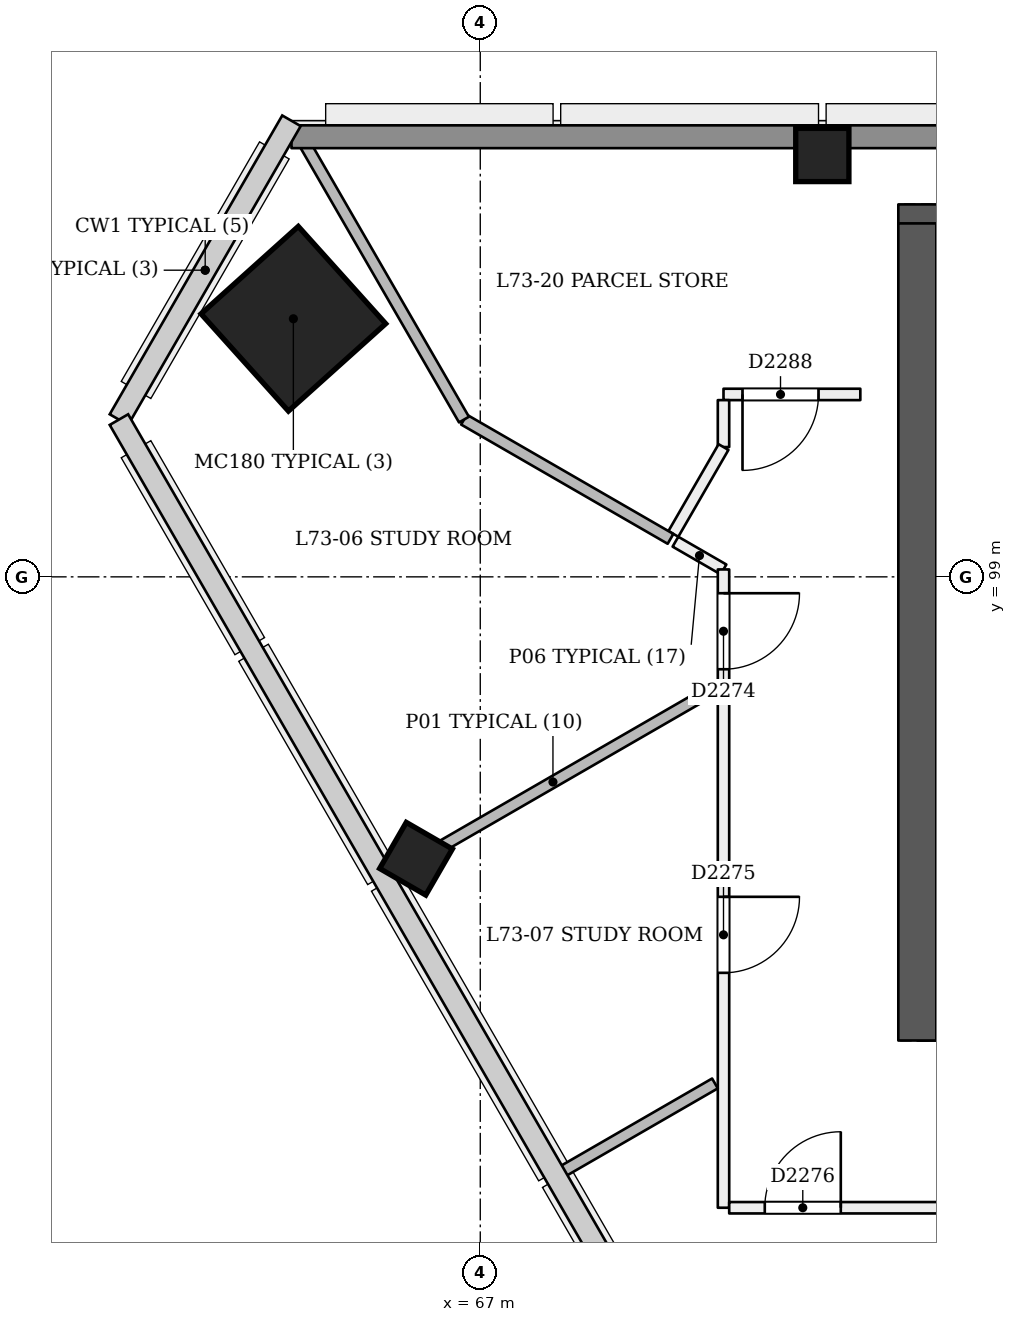
"""IFC4 building model, lengths in metres.
Left out: names, types, materials, properties, quantities, classifications, styles, units other than length and angle.
Written with IfcOpenShell. Run it as: python <this file> out.ifc"""

import sys

from ifc_helpers import new_model, si_unit, direction, frame, frame_2d, origin, origin_2d, place, context, subcontext, project, spatial, rectangle, extrude, element, fill, save


model = new_model("IFC4")
c1 = context("Model", 3, precision=1e-05, world=origin(), true_north=direction((0.0, 1.0)))
c2 = subcontext(c1, "Body", "Model", "MODEL_VIEW")
j1 = project(units=[si_unit("LENGTHUNIT", "METRE"), si_unit("PLANEANGLEUNIT", "RADIAN")], contexts=[c1])
p1 = place(None, origin())
s1 = spatial("IfcSite", under=j1, at=p1, CompositionType="ELEMENT")
p2 = place(p1, origin())
s2 = spatial("IfcBuilding", under=s1, at=p2, CompositionType="ELEMENT")
p3 = place(p2, frame((0.0, 0.0, 282.4)))
s3 = spatial("IfcBuildingStorey", under=s2, at=p3, CompositionType="ELEMENT", Elevation=282.4)
p4 = place(p3, frame((72.75, 93.15, 0.0), z_axis=(0.0, 0.0, 1.0), x_axis=(1.0, 0.0, 0.0)))
e1 = element("IfcWall", 1, at=p4, inside=s3, PredefinedType="SHEAR", context=c2, shape_type="SweptSolid", body=[
    extrude(rectangle(XDim=24.75, YDim=0.5, at=frame_2d((12.375, 0.0))), origin(), (0.0, 0.0, 1.0), 3.6),
])
p5 = place(p4, frame((1.05, 0.0, 0.0)))
e2 = element("IfcOpeningElement", 2, at=p5, cuts=e1, PredefinedType="OPENING", context=c2, shape_type="SweptSolid", body=[
    extrude(rectangle(XDim=1.2, YDim=2.1, at=frame_2d((0.6, 1.05))), frame((0.0, 0.26, 0.0), z_axis=(0.0, -1.0, 0.0), x_axis=(1.0, 0.0, 0.0)), (0.0, 0.0, 1.0), 0.521),
])
p6 = place(p4, frame((3.25, 0.0, 0.0)))
e3 = element("IfcOpeningElement", 3, at=p6, cuts=e1, PredefinedType="OPENING", context=c2, shape_type="SweptSolid", body=[
    extrude(rectangle(XDim=1.2, YDim=2.1, at=frame_2d((0.6, 1.05))), frame((0.0, 0.26, 0.0), z_axis=(0.0, -1.0, 0.0), x_axis=(1.0, 0.0, 0.0)), (0.0, 0.0, 1.0), 0.521),
])
p7 = place(p4, frame((13.25, 0.0, 0.0)))
e4 = element("IfcOpeningElement", 4, at=p7, cuts=e1, PredefinedType="OPENING", context=c2, shape_type="SweptSolid", body=[
    extrude(rectangle(XDim=1.2, YDim=2.1, at=frame_2d((0.6, 1.05))), frame((0.0, 0.26, 0.0), z_axis=(0.0, -1.0, 0.0), x_axis=(1.0, 0.0, 0.0)), (0.0, 0.0, 1.0), 0.521),
])
p8 = place(p4, frame((15.562, 0.0, 0.0)))
e5 = element("IfcOpeningElement", 5, at=p8, cuts=e1, PredefinedType="OPENING", context=c2, shape_type="SweptSolid", body=[
    extrude(rectangle(XDim=1.0, YDim=2.1, at=frame_2d((0.5, 1.05))), frame((0.0, 0.26, 0.0), z_axis=(0.0, -1.0, 0.0), x_axis=(1.0, 0.0, 0.0)), (0.0, 0.0, 1.0), 0.521),
])
p9 = place(p4, frame((19.0, 0.0, 0.0)))
e6 = element("IfcOpeningElement", 6, at=p9, cuts=e1, PredefinedType="OPENING", context=c2, shape_type="SweptSolid", body=[
    extrude(rectangle(XDim=1.0, YDim=2.1, at=frame_2d((0.5, 1.05))), frame((0.0, 0.26, 0.0), z_axis=(0.0, -1.0, 0.0), x_axis=(1.0, 0.0, 0.0)), (0.0, 0.0, 1.0), 0.521),
])
p10 = place(p4, frame((22.538, 0.0, 0.0)))
e7 = element("IfcOpeningElement", 7, at=p10, cuts=e1, PredefinedType="OPENING", context=c2, shape_type="SweptSolid", body=[
    extrude(rectangle(XDim=1.0, YDim=2.1, at=frame_2d((0.5, 1.05))), frame((0.0, 0.26, 0.0), z_axis=(0.0, -1.0, 0.0), x_axis=(1.0, 0.0, 0.0)), (0.0, 0.0, 1.0), 0.521),
])
p11 = place(p3, frame((97.25, 103.65, 0.0), z_axis=(0.0, 0.0, 1.0), x_axis=(-1.0, 0.0, 0.0)))
e8 = element("IfcWall", 8, at=p11, inside=s3, PredefinedType="SHEAR", context=c2, shape_type="SweptSolid", body=[
    extrude(rectangle(XDim=24.75, YDim=0.5, at=frame_2d((12.375, 0.0))), origin(), (0.0, 0.0, 1.0), 3.6),
])
p12 = place(p3, frame((72.75, 103.65, 0.0), z_axis=(0.0, 0.0, 1.0), x_axis=(0.0, -1.0, 0.0)))
e9 = element("IfcWall", 9, at=p12, inside=s3, PredefinedType="SHEAR", context=c2, shape_type="SweptSolid", body=[
    extrude(rectangle(XDim=10.75, YDim=0.5, at=frame_2d((5.375, 0.0))), origin(), (0.0, 0.0, 1.0), 3.6),
])
p13 = place(p3, frame((64.507, 102.384, 0.0), z_axis=(0.028401796786, 0.009286506348, 0.999553449666), x_axis=(-0.866197483961, 0.499302483219, 0.019973708503)))
e10 = element("IfcColumn", 10, at=p13, inside=s3, PredefinedType="COLUMN", context=c2, shape_type="SweptSolid", body=[
    extrude(rectangle(XDim=1.72, YDim=1.72, at=origin_2d()), origin(), (0.0, 0.0, 1.0), 3.602),
])
p14 = place(p3, frame((71.5, 104.55, 0.0), z_axis=(0.0, 0.0, 1.0), x_axis=(1.0, 0.0, 0.0)))
e11 = element("IfcColumn", 11, at=p14, inside=s3, PredefinedType="COLUMN", context=c2, shape_type="SweptSolid", body=[
    extrude(rectangle(XDim=0.7, YDim=0.7, at=origin_2d()), origin(), (0.0, 0.0, 1.0), 3.6),
])
p15 = place(p3, frame((66.127, 95.245, -0.021), z_axis=(0.022225733404, 0.03845725386, 0.999013041156), x_axis=(-0.865819366365, -0.498875864033, 0.03846683134)))
e12 = element("IfcColumn", 12, at=p15, inside=s3, PredefinedType="COLUMN", context=c2, shape_type="SweptSolid", body=[
    extrude(rectangle(XDim=0.7, YDim=0.7, at=origin_2d()), origin(), (0.0, 0.0, 1.0), 3.625),
])
p16 = place(p3, frame((69.568, 99.462, 0.0), z_axis=(0.0, 0.0, 1.0), x_axis=(0.865990618459, -0.500060245112, 0.0)))
e13 = element("IfcWall", 13, at=p16, inside=s3, PredefinedType="PARTITIONING", context=c2, shape_type="SweptSolid", body=[
    extrude(rectangle(XDim=0.73, YDim=0.15, at=frame_2d((0.365, 0.0))), origin(), (0.0, 0.0, 1.0), 3.3),
])
p17 = place(p3, frame((70.2, 99.097, 0.0), z_axis=(0.0, 0.0, 1.0), x_axis=(0.0, -1.0, 0.0)))
e14 = element("IfcWall", 14, at=p17, inside=s3, PredefinedType="PARTITIONING", context=c2, shape_type="SweptSolid", body=[
    extrude(rectangle(XDim=8.397, YDim=0.15, at=frame_2d((4.199, 0.0))), origin(), (0.0, 0.0, 1.0), 3.3),
])
p18 = place(p17, frame((0.313, 0.0, 0.0)))
e15 = element("IfcOpeningElement", 15, at=p18, cuts=e14, PredefinedType="OPENING", context=c2, shape_type="SweptSolid", body=[
    extrude(rectangle(XDim=1.0, YDim=2.1, at=frame_2d((0.5, 1.05))), frame((0.0, 0.085, 0.0), z_axis=(0.0, -1.0, 0.0), x_axis=(1.0, 0.0, 0.0)), (0.0, 0.0, 1.0), 0.171),
])
p19 = place(p17, frame((4.307, 0.0, 0.0)))
e16 = element("IfcOpeningElement", 16, at=p19, cuts=e14, PredefinedType="OPENING", context=c2, shape_type="SweptSolid", body=[
    extrude(rectangle(XDim=1.0, YDim=2.1, at=frame_2d((0.5, 1.05))), frame((0.0, 0.085, 0.0), z_axis=(0.0, -1.0, 0.0), x_axis=(1.0, 0.0, 0.0)), (0.0, 0.0, 1.0), 0.171),
])
p20 = place(p3, frame((70.275, 90.7, 0.0), z_axis=(0.0, 0.0, 1.0), x_axis=(1.0, 0.0, 0.0)))
e17 = element("IfcWall", 17, at=p20, inside=s3, PredefinedType="PARTITIONING", context=c2, shape_type="SweptSolid", body=[
    extrude(rectangle(XDim=5.463, YDim=0.15, at=frame_2d((2.732, 0.0))), origin(), (0.0, 0.0, 1.0), 2.9),
])
p21 = place(p20, frame((0.468, 0.0, 0.0)))
e18 = element("IfcOpeningElement", 18, at=p21, cuts=e17, PredefinedType="OPENING", context=c2, shape_type="SweptSolid", body=[
    extrude(rectangle(XDim=1.0, YDim=2.1, at=frame_2d((0.5, 1.05))), frame((0.0, 0.085, 0.0), z_axis=(0.0, -1.0, 0.0), x_axis=(1.0, 0.0, 0.0)), (0.0, 0.0, 1.0), 0.171),
])
p22 = place(p3, frame((72.0, 101.4, 0.0), z_axis=(0.0, 0.0, 1.0), x_axis=(-1.0, 0.0, 0.0)))
e19 = element("IfcWall", 19, at=p22, inside=s3, PredefinedType="PARTITIONING", context=c2, shape_type="SweptSolid", body=[
    extrude(rectangle(XDim=1.8, YDim=0.15, at=frame_2d((0.9, 0.0))), origin(), (0.0, 0.0, 1.0), 3.3),
])
p23 = place(p22, frame((0.55, 0.0, 0.0)))
e20 = element("IfcOpeningElement", 20, at=p23, cuts=e19, PredefinedType="OPENING", context=c2, shape_type="SweptSolid", body=[
    extrude(rectangle(XDim=1.0, YDim=2.1, at=frame_2d((0.5, 1.05))), frame((0.0, 0.085, 0.0), z_axis=(0.0, -1.0, 0.0), x_axis=(1.0, 0.0, 0.0)), (0.0, 0.0, 1.0), 0.171),
])
p24 = place(p3, frame((70.2, 101.325, 0.0), z_axis=(0.0, 0.0, 1.0), x_axis=(0.0, -1.0, 0.0)))
e21 = element("IfcWall", 21, at=p24, inside=s3, PredefinedType="PARTITIONING", context=c2, shape_type="SweptSolid", body=[
    extrude(rectangle(XDim=0.617, YDim=0.15, at=frame_2d((0.309, 0.0))), origin(), (0.0, 0.0, 1.0), 3.3),
])
p25 = place(p3, frame((70.2, 100.708, 0.0), z_axis=(0.0, 0.0, 1.0), x_axis=(-0.500000102728, -0.866025344474, 0.0)))
e22 = element("IfcWall", 22, at=p25, inside=s3, PredefinedType="PARTITIONING", context=c2, shape_type="SweptSolid", body=[
    extrude(rectangle(XDim=1.319, YDim=0.15, at=frame_2d((0.66, 0.0))), origin(), (0.0, 0.0, 1.0), 3.3),
])
p26 = place(p3, frame((65.825, 95.07, 0.0), z_axis=(0.0, 0.0, 1.0), x_axis=(0.866003030001, 0.500038750527, 0.0)))
e23 = element("IfcWall", 23, at=p26, inside=s3, PredefinedType="PARTITIONING", context=c2, shape_type="SweptSolid", body=[
    extrude(rectangle(XDim=4.922, YDim=0.15, at=frame_2d((2.461, 0.0))), origin(), (0.0, 0.0, 1.0), 3.3),
])
p27 = place(p3, frame((69.503, 99.5, 0.0), z_axis=(0.0, 0.0, 1.0), x_axis=(-0.866022320763, 0.500005339912, 0.0)))
e24 = element("IfcWall", 24, at=p27, inside=s3, PredefinedType="PARTITIONING", context=c2, shape_type="SweptSolid", body=[
    extrude(rectangle(XDim=3.138, YDim=0.15, at=frame_2d((1.569, 0.0))), origin(), (0.0, 0.0, 1.0), 3.3),
])
p28 = place(p3, frame((66.786, 101.069, 0.0), z_axis=(0.0, 0.0, 1.0), x_axis=(-0.500009088543, 0.866020156448, 0.0)))
e25 = element("IfcWall", 25, at=p28, inside=s3, PredefinedType="PARTITIONING", context=c2, shape_type="SweptSolid", body=[
    extrude(rectangle(XDim=4.424, YDim=0.15, at=frame_2d((2.212, 0.0))), origin(), (0.0, 0.0, 1.0), 3.3),
])
p29 = place(p3, frame((68.057, 91.163, 0.0), z_axis=(0.0, 0.0, 1.0), x_axis=(0.866010407637, 0.500025973189, 0.0)))
e26 = element("IfcWall", 26, at=p29, inside=s3, PredefinedType="PARTITIONING", context=c2, shape_type="SweptSolid", body=[
    extrude(rectangle(XDim=2.344, YDim=0.15, at=frame_2d((1.172, 0.0))), origin(), (0.0, 0.0, 1.0), 3.3),
])
p30 = place(p3, frame((64.516, 104.79, 0.0), z_axis=(0.0, 0.0, 1.0), x_axis=(1.0, 0.0, 0.0)))
e27 = element("IfcWall", 27, at=p30, inside=s3, PredefinedType="SOLIDWALL", context=c2, shape_type="SweptSolid", body=[
    extrude(rectangle(XDim=40.968, YDim=0.3, at=frame_2d((20.484, 0.0))), origin(), (0.0, 0.0, 1.0), 3.3),
])
p31 = place(p18, origin())
e28 = element("IfcDoor", 28, at=p31, inside=s3, OperationType="SINGLE_SWING_LEFT", PredefinedType="NOTDEFINED", context=c2, shape_type="SweptSolid", body=[
    extrude(rectangle(XDim=1.0, YDim=2.1, at=frame_2d((0.5, 1.05))), frame((0.0, 0.025, 0.0), z_axis=(0.0, -1.0, 0.0), x_axis=(1.0, 0.0, 0.0)), (0.0, 0.0, 1.0), 0.05),
])
fill(e15, e28)
p32 = place(p19, origin())
e29 = element("IfcDoor", 29, at=p32, inside=s3, OperationType="SINGLE_SWING_LEFT", PredefinedType="NOTDEFINED", context=c2, shape_type="SweptSolid", body=[
    extrude(rectangle(XDim=1.0, YDim=2.1, at=frame_2d((0.5, 1.05))), frame((0.0, 0.025, 0.0), z_axis=(0.0, -1.0, 0.0), x_axis=(1.0, 0.0, 0.0)), (0.0, 0.0, 1.0), 0.05),
])
fill(e16, e29)
p33 = place(p21, origin())
e30 = element("IfcDoor", 30, at=p33, inside=s3, OperationType="SINGLE_SWING_RIGHT", PredefinedType="NOTDEFINED", context=c2, shape_type="SweptSolid", body=[
    extrude(rectangle(XDim=1.0, YDim=2.1, at=frame_2d((0.5, 1.05))), frame((0.0, 0.025, 0.0), z_axis=(0.0, -1.0, 0.0), x_axis=(1.0, 0.0, 0.0)), (0.0, 0.0, 1.0), 0.05),
])
fill(e18, e30)
p34 = place(p23, origin())
e31 = element("IfcDoor", 31, at=p34, inside=s3, OperationType="SINGLE_SWING_RIGHT", PredefinedType="NOTDEFINED", context=c2, shape_type="SweptSolid", body=[
    extrude(rectangle(XDim=1.0, YDim=2.1, at=frame_2d((0.5, 1.05))), frame((0.0, 0.025, 0.0), z_axis=(0.0, -1.0, 0.0), x_axis=(1.0, 0.0, 0.0)), (0.0, 0.0, 1.0), 0.05),
])
fill(e20, e31)
save(model, sys.argv[1])
